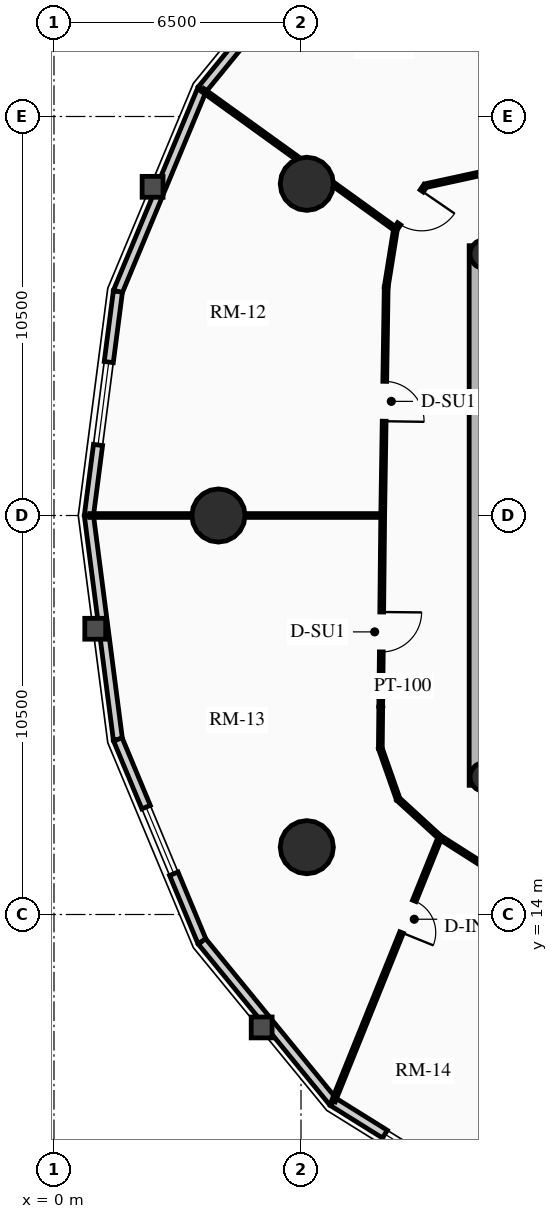
"""IFC4 building model, lengths in metres.
Left out: names, types, materials, properties, quantities, classifications, styles, units other than length and angle.
Written with IfcOpenShell. Run it as: python <this file> out.ifc"""

import sys

from ifc_helpers import new_model, si_unit, direction, frame, frame_2d, origin, origin_2d, place, context, subcontext, project, spatial, rectangle, circle, hollow_circle, extrude, source, transform, mapped, element, fill, save


model = new_model("IFC4")
c1 = context("Model", 3, precision=1e-05, world=origin(), true_north=direction((0.0, 1.0)))
c2 = subcontext(c1, "Body", "Model", "MODEL_VIEW")
j1 = project(units=[si_unit("LENGTHUNIT", "METRE"), si_unit("PLANEANGLEUNIT", "RADIAN")], contexts=[c1])
p1 = place(None, origin())
s1 = spatial("IfcSite", under=j1, at=p1, CompositionType="ELEMENT")
p2 = place(p1, origin())
s2 = spatial("IfcBuilding", under=s1, at=p2, CompositionType="ELEMENT")
p3 = place(p2, frame((0.0, 0.0, 96.34)))
s3 = spatial("IfcBuildingStorey", under=s2, at=p3, CompositionType="ELEMENT", Elevation=96.34)
p4 = place(p3, frame((11.15, 17.4, 0.0), z_axis=(0.0, 0.0, 1.0), x_axis=(0.0, 1.0, 0.0)))
e1 = element("IfcWall", 1, at=p4, inside=s3, PredefinedType="SHEAR", context=c2, shape_type="SweptSolid", body=[
    extrude(rectangle(XDim=14.2, YDim=0.45, at=frame_2d((7.1, 0.0))), origin(), (0.0, 0.0, 1.0), 2.91),
])
p5 = place(p3, frame((11.15, 17.625, 0.0), z_axis=(0.0, 0.0, 1.0), x_axis=(1.0, 0.0, 0.0)))
e2 = element("IfcWall", 2, at=p5, inside=s3, PredefinedType="SHEAR", context=c2, shape_type="SweptSolid", body=[
    extrude(rectangle(XDim=10.7, YDim=0.45, at=frame_2d((5.35, 0.0))), origin(), (0.0, 0.0, 1.0), 2.91),
])
m1 = source(origin(), c2, "Body", "SweptSolid", [
    extrude(rectangle(XDim=1.5, YDim=2.02, at=frame_2d((0.75, 1.01))), frame((0.0, 0.235, 0.0), z_axis=(0.0, -1.0, 0.0), x_axis=(1.0, 0.0, 0.0)), (0.0, 0.0, 1.0), 0.47),
])
p6 = place(p5, frame((5.45, 0.0, 0.0)))
e3 = element("IfcOpeningElement", 3, at=p6, cuts=e2, PredefinedType="OPENING", context=c2, shape_type="MappedRepresentation", body=[
    mapped(m1, transform((0.0, 0.0, 0.0), x_axis=(1.0, 0.0, 0.0), y_axis=(0.0, 1.0, 0.0), z_axis=(0.0, 0.0, 1.0), scale=1.0)),
])
p7 = place(p3, frame((11.15, 31.375, 0.0), z_axis=(0.0, 0.0, 1.0), x_axis=(1.0, 0.0, 0.0)))
e4 = element("IfcWall", 4, at=p7, inside=s3, PredefinedType="SHEAR", context=c2, shape_type="SweptSolid", body=[
    extrude(rectangle(XDim=10.7, YDim=0.45, at=frame_2d((5.35, 0.0))), origin(), (0.0, 0.0, 1.0), 2.91),
])
p8 = place(p7, frame((4.6, 0.0, 0.0)))
e5 = element("IfcOpeningElement", 5, at=p8, cuts=e4, PredefinedType="OPENING", context=c2, shape_type="MappedRepresentation", body=[
    mapped(m1, transform((0.0, 0.0, 0.0), x_axis=(1.0, 0.0, 0.0), y_axis=(0.0, 1.0, 0.0), z_axis=(0.0, 0.0, 1.0), scale=1.0)),
])
for number, where, z_axis, x_axis in (
    (6, (11.325, 17.62, 0.0), (0.0, 0.0, 1.0), (1.0, 0.0, 0.0)),
    (7, (11.325, 31.38, 0.0), (0.0, 0.0, 1.0), (1.0, 0.0, 0.0)),
):
    element("IfcColumn", number, at=place(p3, frame(where, z_axis=z_axis, x_axis=x_axis)), inside=s3, PredefinedType="COLUMN", context=c2, shape_type="SweptSolid", body=[
        extrude(hollow_circle(Radius=0.38, WallThickness=0.032, at=origin_2d()), origin(), (0.0, 0.0, 1.0), 2.91),
    ])
for number, where, z_axis, x_axis in (
    (8, (6.653, 33.229, 0.0), (0.0, 0.0, 1.0), (1.0, 0.0, 0.0)),
    (9, (4.328, 24.5, 0.0), (0.0, 0.0, 1.0), (1.0, 0.0, 0.0)),
    (10, (6.653, 15.771, 0.0), (0.0, 0.0, 1.0), (1.0, 0.0, 0.0)),
):
    element("IfcColumn", number, at=place(p3, frame(where, z_axis=z_axis, x_axis=x_axis)), inside=s3, PredefinedType="USERDEFINED", context=c2, shape_type="SweptSolid", body=[
        extrude(circle(Radius=0.7, at=origin_2d()), origin(), (0.0, 0.0, 1.0), 2.91),
    ])
p9 = place(p3, frame((3.895, 35.709, 0.0), z_axis=(0.0, 0.0, 1.0), x_axis=(0.632700781152, 0.77439635945, 0.0)))
e11 = element("IfcWall", 11, at=p9, inside=s3, PredefinedType="SOLIDWALL", context=c2, shape_type="SweptSolid", body=[
    extrude(rectangle(XDim=5.448, YDim=0.24, at=frame_2d((2.724, 0.0))), origin(), (0.0, 0.0, 1.0), 2.179),
])
m2 = source(origin(), c2, "Body", "SweptSolid", [
    extrude(rectangle(XDim=1.9, YDim=1.35, at=frame_2d((0.95, 0.675))), frame((0.0, 0.13, 0.0), z_axis=(0.0, -1.0, 0.0), x_axis=(1.0, 0.0, 0.0)), (0.0, 0.0, 1.0), 0.26),
])
p10 = place(p9, frame((1.774, 0.0, 0.65)))
e12 = element("IfcOpeningElement", 12, at=p10, cuts=e11, PredefinedType="OPENING", context=c2, shape_type="MappedRepresentation", body=[
    mapped(m2, transform((0.0, 0.0, 0.0), x_axis=(1.0, 0.0, 0.0), y_axis=(0.0, 1.0, 0.0), z_axis=(0.0, 0.0, 1.0), scale=1.0)),
])
p11 = place(p3, frame((1.682, 30.393, 0.0), z_axis=(0.0, 0.0, 1.0), x_axis=(0.384344417632, 0.923189779317, 0.0)))
e13 = element("IfcWall", 13, at=p11, inside=s3, PredefinedType="SOLIDWALL", context=c2, shape_type="SweptSolid", body=[
    extrude(rectangle(XDim=5.758, YDim=0.24, at=frame_2d((2.879, 0.0))), origin(), (0.0, 0.0, 1.0), 2.179),
])
p12 = place(p3, frame((0.919, 24.5, 0.0), z_axis=(0.0, 0.0, 1.0), x_axis=(0.128351991996, 0.991728675672, 0.0)))
e14 = element("IfcWall", 14, at=p12, inside=s3, PredefinedType="SOLIDWALL", context=c2, shape_type="SweptSolid", body=[
    extrude(rectangle(XDim=5.942, YDim=0.24, at=frame_2d((2.971, 0.0))), origin(), (0.0, 0.0, 1.0), 2.179),
])
m3 = source(origin(), c2, "Body", "SweptSolid", [
    extrude(rectangle(XDim=2.2, YDim=1.35, at=frame_2d((1.1, 0.675))), frame((0.0, 0.13, 0.0), z_axis=(0.0, -1.0, 0.0), x_axis=(1.0, 0.0, 0.0)), (0.0, 0.0, 1.0), 0.26),
])
p13 = place(p12, frame((1.871, 0.0, 0.65)))
e15 = element("IfcOpeningElement", 15, at=p13, cuts=e14, PredefinedType="OPENING", context=c2, shape_type="MappedRepresentation", body=[
    mapped(m3, transform((0.0, 0.0, 0.0), x_axis=(1.0, 0.0, 0.0), y_axis=(0.0, 1.0, 0.0), z_axis=(0.0, 0.0, 1.0), scale=1.0)),
])
p14 = place(p3, frame((1.682, 18.607, 0.0), z_axis=(0.0, 0.0, 1.0), x_axis=(-0.128351991996, 0.991728675672, 0.0)))
e16 = element("IfcWall", 16, at=p14, inside=s3, PredefinedType="SOLIDWALL", context=c2, shape_type="SweptSolid", body=[
    extrude(rectangle(XDim=5.942, YDim=0.24, at=frame_2d((2.971, 0.0))), origin(), (0.0, 0.0, 1.0), 2.179),
])
p15 = place(p3, frame((3.895, 13.291, 0.0), z_axis=(0.0, 0.0, 1.0), x_axis=(-0.384344417632, 0.923189779317, 0.0)))
e17 = element("IfcWall", 17, at=p15, inside=s3, PredefinedType="SOLIDWALL", context=c2, shape_type="SweptSolid", body=[
    extrude(rectangle(XDim=5.758, YDim=0.24, at=frame_2d((2.879, 0.0))), origin(), (0.0, 0.0, 1.0), 2.179),
])
p16 = place(p15, frame((1.929, 0.0, 0.65)))
e18 = element("IfcOpeningElement", 18, at=p16, cuts=e17, PredefinedType="OPENING", context=c2, shape_type="MappedRepresentation", body=[
    mapped(m2, transform((0.0, 0.0, 0.0), x_axis=(1.0, 0.0, 0.0), y_axis=(0.0, 1.0, 0.0), z_axis=(0.0, 0.0, 1.0), scale=1.0)),
])
p17 = place(p3, frame((7.342, 9.072, 0.0), z_axis=(0.0, 0.0, 1.0), x_axis=(-0.632700781152, 0.77439635945, 0.0)))
e19 = element("IfcWall", 19, at=p17, inside=s3, PredefinedType="SOLIDWALL", context=c2, shape_type="SweptSolid", body=[
    extrude(rectangle(XDim=5.448, YDim=0.24, at=frame_2d((2.724, 0.0))), origin(), (0.0, 0.0, 1.0), 2.179),
])
p18 = place(p3, frame((11.685, 6.363, 0.0), z_axis=(0.0, 0.0, 1.0), x_axis=(-0.848520380187, 0.529162701263, 0.0)))
e20 = element("IfcWall", 20, at=p18, inside=s3, PredefinedType="SOLIDWALL", context=c2, shape_type="SweptSolid", body=[
    extrude(rectangle(XDim=5.119, YDim=0.24, at=frame_2d((2.56, 0.0))), origin(), (0.0, 0.0, 1.0), 2.179),
])
p19 = place(p18, frame((1.609, 0.0, 0.65)))
e21 = element("IfcOpeningElement", 21, at=p19, cuts=e20, PredefinedType="OPENING", context=c2, shape_type="MappedRepresentation", body=[
    mapped(m2, transform((0.0, 0.0, 0.0), x_axis=(1.0, 0.0, 0.0), y_axis=(0.0, 1.0, 0.0), z_axis=(0.0, 0.0, 1.0), scale=1.0)),
])
p20 = place(p3, frame((11.65, 33.588, 0.0), z_axis=(0.0, 0.0, 1.0), x_axis=(-0.977141987047, -0.212587716366, 0.0)))
e22 = element("IfcWall", 22, at=p20, inside=s3, PredefinedType="MOVABLE", context=c2, shape_type="SweptSolid", body=[
    extrude(rectangle(XDim=1.924, YDim=0.1, at=frame_2d((0.962, 0.0))), origin(), (0.0, 0.0, 1.0), 2.225),
])
p21 = place(p3, frame((9.771, 33.179, 0.0), z_axis=(0.0, 0.0, 1.0), x_axis=(-0.56664857412, -0.823959582412, 0.0)))
e23 = element("IfcWall", 23, at=p21, inside=s3, PredefinedType="MOVABLE", context=c2, shape_type="SweptSolid", body=[
    extrude(rectangle(XDim=1.384, YDim=0.1, at=frame_2d((0.692, 0.0))), origin(), (0.0, 0.0, 1.0), 2.225),
])
m4 = source(origin(), c2, "Body", "SweptSolid", [
    extrude(rectangle(XDim=1.05, YDim=2.015, at=frame_2d((0.525, 1.007))), frame((0.0, 0.06, 0.0), z_axis=(0.0, -1.0, 0.0), x_axis=(1.0, 0.0, 0.0)), (0.0, 0.0, 1.0), 0.12),
])
p22 = place(p21, frame((0.167, 0.0, 0.0)))
e24 = element("IfcOpeningElement", 24, at=p22, cuts=e23, PredefinedType="OPENING", context=c2, shape_type="MappedRepresentation", body=[
    mapped(m4, transform((0.0, 0.0, 0.0), x_axis=(1.0, 0.0, 0.0), y_axis=(0.0, 1.0, 0.0), z_axis=(0.0, 0.0, 1.0), scale=1.0)),
])
p23 = place(p3, frame((8.986, 32.038, 0.0), z_axis=(0.0, 0.0, 1.0), x_axis=(-0.158224526738, -0.987403159372, 0.0)))
e25 = element("IfcWall", 25, at=p23, inside=s3, PredefinedType="MOVABLE", context=c2, shape_type="SweptSolid", body=[
    extrude(rectangle(XDim=1.546, YDim=0.1, at=frame_2d((0.773, 0.0))), origin(), (0.0, 0.0, 1.0), 2.225),
])
p24 = place(p3, frame((8.742, 30.512, 0.0), z_axis=(0.0, 0.0, 1.0), x_axis=(-0.015267875777, -0.999883439191, 0.0)))
e26 = element("IfcWall", 26, at=p24, inside=s3, PredefinedType="MOVABLE", context=c2, shape_type="SweptSolid", body=[
    extrude(rectangle(XDim=6.012, YDim=0.1, at=frame_2d((3.006, 0.0))), origin(), (0.0, 0.0, 1.0), 2.655),
])
p25 = place(p24, frame((2.481, 0.0, 0.0)))
e27 = element("IfcOpeningElement", 27, at=p25, cuts=e26, PredefinedType="OPENING", context=c2, shape_type="MappedRepresentation", body=[
    mapped(m4, transform((0.0, 0.0, 0.0), x_axis=(1.0, 0.0, 0.0), y_axis=(0.0, 1.0, 0.0), z_axis=(0.0, 0.0, 1.0), scale=1.0)),
])
p26 = place(p3, frame((8.65, 24.5, 0.0), z_axis=(0.0, 0.0, 1.0), x_axis=(-0.010196235655, -0.999948017038, 0.0)))
e28 = element("IfcWall", 28, at=p26, inside=s3, PredefinedType="MOVABLE", context=c2, shape_type="SweptSolid", body=[
    extrude(rectangle(XDim=6.13, YDim=0.1, at=frame_2d((3.065, 0.0))), origin(), (0.0, 0.0, 1.0), 2.225),
])
p27 = place(p26, frame((2.54, 0.0, 0.0)))
e29 = element("IfcOpeningElement", 29, at=p27, cuts=e28, PredefinedType="OPENING", context=c2, shape_type="MappedRepresentation", body=[
    mapped(m4, transform((0.0, 0.0, 0.0), x_axis=(1.0, 0.0, 0.0), y_axis=(0.0, 1.0, 0.0), z_axis=(0.0, 0.0, 1.0), scale=1.0)),
])
p28 = place(p3, frame((8.587, 18.371, 0.0), z_axis=(0.0, 0.0, 1.0), x_axis=(0.331494289155, -0.943457225452, 0.0)))
e30 = element("IfcWall", 30, at=p28, inside=s3, PredefinedType="MOVABLE", context=c2, shape_type="SweptSolid", body=[
    extrude(rectangle(XDim=1.416, YDim=0.1, at=frame_2d((0.708, 0.0))), origin(), (0.0, 0.0, 1.0), 2.225),
])
p29 = place(p3, frame((9.057, 17.034, 0.0), z_axis=(0.0, 0.0, 1.0), x_axis=(0.737874877538, -0.674937526811, 0.0)))
e31 = element("IfcWall", 31, at=p29, inside=s3, PredefinedType="MOVABLE", context=c2, shape_type="SweptSolid", body=[
    extrude(rectangle(XDim=1.49, YDim=0.1, at=frame_2d((0.745, 0.0))), origin(), (0.0, 0.0, 1.0), 2.225),
])
p30 = place(p3, frame((10.156, 16.029, 0.0), z_axis=(0.0, 0.0, 1.0), x_axis=(0.843127549493, -0.537713618282, 0.0)))
e32 = element("IfcWall", 32, at=p30, inside=s3, PredefinedType="MOVABLE", context=c2, shape_type="SweptSolid", body=[
    extrude(rectangle(XDim=1.583, YDim=0.1, at=frame_2d((0.792, 0.0))), origin(), (0.0, 0.0, 1.0), 2.225),
])
p31 = place(p3, frame((8.986, 32.038, 0.0), z_axis=(0.0, 0.0, 1.0), x_axis=(-0.811184127106, 0.584790827502, 0.0)))
e33 = element("IfcWall", 33, at=p31, inside=s3, PredefinedType="MOVABLE", context=c2, shape_type="SweptSolid", body=[
    extrude(rectangle(XDim=6.257, YDim=0.1, at=frame_2d((3.128, 0.0))), origin(), (0.0, 0.0, 1.0), 2.179),
])
p32 = place(p3, frame((8.65, 24.5, 0.0), z_axis=(0.0, 0.0, 1.0), x_axis=(-1.0, 0.0, 0.0)))
e34 = element("IfcWall", 34, at=p32, inside=s3, PredefinedType="MOVABLE", context=c2, shape_type="SweptSolid", body=[
    extrude(rectangle(XDim=7.711, YDim=0.1, at=frame_2d((3.855, 0.0))), origin(), (0.0, 0.0, 1.0), 2.179),
])
p33 = place(p3, frame((10.156, 16.029, 0.0), z_axis=(0.0, 0.0, 1.0), x_axis=(-0.374397256956, -0.9272684045, 0.0)))
e35 = element("IfcWall", 35, at=p33, inside=s3, PredefinedType="MOVABLE", context=c2, shape_type="SweptSolid", body=[
    extrude(rectangle(XDim=7.485, YDim=0.1, at=frame_2d((3.743, 0.0))), origin(), (0.0, 0.0, 1.0), 2.179),
])
m5 = source(origin(), c2, "Body", "SweptSolid", [
    extrude(rectangle(XDim=0.9, YDim=2.005, at=frame_2d((0.45, 1.002))), frame((0.0, 0.06, 0.0), z_axis=(0.0, -1.0, 0.0), x_axis=(1.0, 0.0, 0.0)), (0.0, 0.0, 1.0), 0.12),
])
p34 = place(p33, frame((1.8, 0.0, 0.0)))
e36 = element("IfcOpeningElement", 36, at=p34, cuts=e35, PredefinedType="OPENING", context=c2, shape_type="MappedRepresentation", body=[
    mapped(m5, transform((0.0, 0.0, 0.0), x_axis=(1.0, 0.0, 0.0), y_axis=(0.0, 1.0, 0.0), z_axis=(0.0, 0.0, 1.0), scale=1.0)),
])
m6 = source(origin(), c2, "Body", "SweptSolid", [
    extrude(rectangle(XDim=2.2, YDim=1.35, at=frame_2d((1.1, 0.675))), frame((0.0, 0.03, 0.0), z_axis=(0.0, -1.0, 0.0), x_axis=(1.0, 0.0, 0.0)), (0.0, 0.0, 1.0), 0.06),
])
p35 = place(p13, origin())
e37 = element("IfcWindow", 37, at=p35, inside=s3, PartitioningType="DOUBLE_PANEL_VERTICAL", PredefinedType="WINDOW", context=c2, shape_type="MappedRepresentation", body=[
    mapped(m6, transform((0.0, 0.0, 0.0), x_axis=(1.0, 0.0, 0.0), y_axis=(0.0, 1.0, 0.0), z_axis=(0.0, 0.0, 1.0), scale=1.0)),
])
fill(e15, e37)
m7 = source(origin(), c2, "Body", "SweptSolid", [
    extrude(rectangle(XDim=1.9, YDim=1.35, at=frame_2d((0.95, 0.675))), frame((0.0, 0.03, 0.0), z_axis=(0.0, -1.0, 0.0), x_axis=(1.0, 0.0, 0.0)), (0.0, 0.0, 1.0), 0.06),
])
p36 = place(p16, origin())
e38 = element("IfcWindow", 38, at=p36, inside=s3, PartitioningType="DOUBLE_PANEL_VERTICAL", PredefinedType="WINDOW", context=c2, shape_type="MappedRepresentation", body=[
    mapped(m7, transform((0.0, 0.0, 0.0), x_axis=(1.0, 0.0, 0.0), y_axis=(0.0, 1.0, 0.0), z_axis=(0.0, 0.0, 1.0), scale=1.0)),
])
fill(e18, e38)
p37 = place(p19, origin())
e39 = element("IfcWindow", 39, at=p37, inside=s3, PartitioningType="DOUBLE_PANEL_VERTICAL", PredefinedType="WINDOW", context=c2, shape_type="MappedRepresentation", body=[
    mapped(m7, transform((0.0, 0.0, 0.0), x_axis=(1.0, 0.0, 0.0), y_axis=(0.0, 1.0, 0.0), z_axis=(0.0, 0.0, 1.0), scale=1.0)),
])
fill(e21, e39)
m8 = source(origin(), c2, "Body", "SweptSolid", [
    extrude(rectangle(XDim=1.05, YDim=2.015, at=frame_2d((0.525, 1.007))), frame((0.0, 0.025, 0.0), z_axis=(0.0, -1.0, 0.0), x_axis=(1.0, 0.0, 0.0)), (0.0, 0.0, 1.0), 0.05),
])
p38 = place(p22, origin())
e40 = element("IfcDoor", 40, at=p38, inside=s3, OperationType="SINGLE_SWING_LEFT", PredefinedType="DOOR", context=c2, shape_type="MappedRepresentation", body=[
    mapped(m8, transform((0.0, 0.0, 0.0), x_axis=(1.0, 0.0, 0.0), y_axis=(0.0, 1.0, 0.0), z_axis=(0.0, 0.0, 1.0), scale=1.0)),
])
fill(e24, e40)
p39 = place(p25, origin())
e41 = element("IfcDoor", 41, at=p39, inside=s3, OperationType="SINGLE_SWING_RIGHT", PredefinedType="DOOR", context=c2, shape_type="MappedRepresentation", body=[
    mapped(m8, transform((0.0, 0.0, 0.0), x_axis=(1.0, 0.0, 0.0), y_axis=(0.0, 1.0, 0.0), z_axis=(0.0, 0.0, 1.0), scale=1.0)),
])
fill(e27, e41)
p40 = place(p27, origin())
e42 = element("IfcDoor", 42, at=p40, inside=s3, OperationType="SINGLE_SWING_LEFT", PredefinedType="DOOR", context=c2, shape_type="MappedRepresentation", body=[
    mapped(m8, transform((0.0, 0.0, 0.0), x_axis=(1.0, 0.0, 0.0), y_axis=(0.0, 1.0, 0.0), z_axis=(0.0, 0.0, 1.0), scale=1.0)),
])
fill(e29, e42)
m9 = source(origin(), c2, "Body", "SweptSolid", [
    extrude(rectangle(XDim=0.9, YDim=2.005, at=frame_2d((0.45, 1.002))), frame((0.0, 0.025, 0.0), z_axis=(0.0, -1.0, 0.0), x_axis=(1.0, 0.0, 0.0)), (0.0, 0.0, 1.0), 0.05),
])
p41 = place(p34, origin())
e43 = element("IfcDoor", 43, at=p41, inside=s3, OperationType="SINGLE_SWING_RIGHT", PredefinedType="DOOR", context=c2, shape_type="MappedRepresentation", body=[
    mapped(m9, transform((0.0, 0.0, 0.0), x_axis=(1.0, 0.0, 0.0), y_axis=(0.0, 1.0, 0.0), z_axis=(0.0, 0.0, 1.0), scale=1.0)),
])
fill(e36, e43)
save(model, sys.argv[1])
